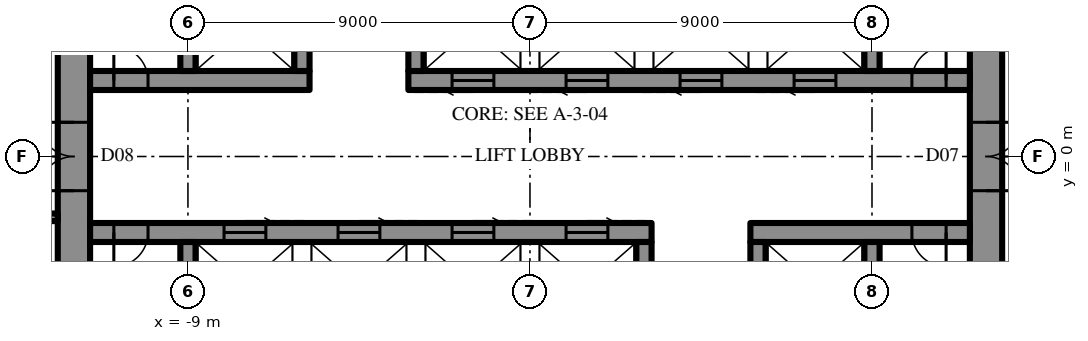
"""IFC4 building model, lengths in metres.
Left out: names, types, materials, properties, quantities, classifications, styles, units other than length and angle.
Written with IfcOpenShell. Run it as: python <this file> out.ifc"""

import sys

from ifc_helpers import new_model, si_unit, direction, frame, frame_2d, origin, place, context, subcontext, project, spatial, rectangle, extrude, element, fill, save


model = new_model("IFC4")
c1 = context("Model", 3, precision=1e-05, world=origin(), true_north=direction((0.0, 1.0)))
c2 = subcontext(c1, "Body", "Model", "MODEL_VIEW")
j1 = project(units=[si_unit("LENGTHUNIT", "METRE"), si_unit("PLANEANGLEUNIT", "RADIAN")], contexts=[c1])
p1 = place(None, origin())
s1 = spatial("IfcSite", under=j1, at=p1, CompositionType="ELEMENT")
p2 = place(p1, origin())
s2 = spatial("IfcBuilding", under=s1, at=p2, CompositionType="ELEMENT")
p3 = place(p2, frame((0.0, 0.0, 357.7)))
s3 = spatial("IfcBuildingStorey", under=s2, at=p3, CompositionType="ELEMENT", Elevation=357.7)
p4 = place(p3, frame((12.0, -10.7, 0.0), z_axis=(0.0, 0.0, 1.0), x_axis=(0.0, 1.0, 0.0)))
e1 = element("IfcWall", 1, at=p4, inside=s3, PredefinedType="SHEAR", context=c2, shape_type="SweptSolid", body=[
    extrude(rectangle(XDim=21.4, YDim=0.85, at=frame_2d((10.7, 0.0))), origin(), (0.0, 0.0, 1.0), 4.2),
])
p5 = place(p4, frame((9.8, 0.0, 0.0)))
e2 = element("IfcOpeningElement", 2, at=p5, cuts=e1, PredefinedType="OPENING", context=c2, shape_type="SweptSolid", body=[
    extrude(rectangle(XDim=1.8, YDim=2.4, at=frame_2d((0.9, 1.2))), frame((0.0, 0.435, 0.0), z_axis=(0.0, -1.0, 0.0), x_axis=(1.0, 0.0, 0.0)), (0.0, 0.0, 1.0), 0.87),
])
p6 = place(p3, frame((-12.0, 10.7, 0.0), z_axis=(0.0, 0.0, 1.0), x_axis=(0.0, -1.0, 0.0)))
e3 = element("IfcWall", 3, at=p6, inside=s3, PredefinedType="SHEAR", context=c2, shape_type="SweptSolid", body=[
    extrude(rectangle(XDim=21.4, YDim=0.85, at=frame_2d((10.7, 0.0))), origin(), (0.0, 0.0, 1.0), 4.2),
])
p7 = place(p6, frame((9.8, 0.0, 0.0)))
e4 = element("IfcOpeningElement", 4, at=p7, cuts=e3, PredefinedType="OPENING", context=c2, shape_type="SweptSolid", body=[
    extrude(rectangle(XDim=1.8, YDim=2.4, at=frame_2d((0.9, 1.2))), frame((0.0, 0.435, 0.0), z_axis=(0.0, -1.0, 0.0), x_axis=(1.0, 0.0, 0.0)), (0.0, 0.0, 1.0), 0.87),
])
p8 = place(p3, frame((-11.575, 2.0, 0.0), z_axis=(0.0, 0.0, 1.0), x_axis=(1.0, 0.0, 0.0)))
e5 = element("IfcWall", 5, at=p8, inside=s3, PredefinedType="SHEAR", context=c2, shape_type="SweptSolid", body=[
    extrude(rectangle(XDim=5.775, YDim=0.5, at=frame_2d((2.887, 0.0))), origin(), (0.0, 0.0, 1.0), 4.2),
])
p9 = place(p8, frame((0.625, 0.0, 0.0)))
e6 = element("IfcOpeningElement", 6, at=p9, cuts=e5, PredefinedType="OPENING", context=c2, shape_type="SweptSolid", body=[
    extrude(rectangle(XDim=0.9, YDim=2.2, at=frame_2d((0.45, 1.1))), frame((0.0, 0.26, 0.0), z_axis=(0.0, -1.0, 0.0), x_axis=(1.0, 0.0, 0.0)), (0.0, 0.0, 1.0), 0.52),
])
p10 = place(p3, frame((-3.2, 2.0, 0.0), z_axis=(0.0, 0.0, 1.0), x_axis=(1.0, 0.0, 0.0)))
e7 = element("IfcWall", 7, at=p10, inside=s3, PredefinedType="SHEAR", context=c2, shape_type="SweptSolid", body=[
    extrude(rectangle(XDim=14.775, YDim=0.5, at=frame_2d((7.387, 0.0))), origin(), (0.0, 0.0, 1.0), 4.2),
])
p11 = place(p10, frame((13.25, 0.0, 0.0)))
e8 = element("IfcOpeningElement", 8, at=p11, cuts=e7, PredefinedType="OPENING", context=c2, shape_type="SweptSolid", body=[
    extrude(rectangle(XDim=0.9, YDim=2.2, at=frame_2d((0.45, 1.1))), frame((0.0, 0.26, 0.0), z_axis=(0.0, -1.0, 0.0), x_axis=(1.0, 0.0, 0.0)), (0.0, 0.0, 1.0), 0.52),
])
p12 = place(p10, frame((1.15, 0.0, 0.0)))
e9 = element("IfcOpeningElement", 9, at=p12, cuts=e7, PredefinedType="OPENING", context=c2, shape_type="SweptSolid", body=[
    extrude(rectangle(XDim=1.1, YDim=2.2, at=frame_2d((0.55, 1.1))), frame((0.0, 0.26, 0.0), z_axis=(0.0, -1.0, 0.0), x_axis=(1.0, 0.0, 0.0)), (0.0, 0.0, 1.0), 0.52),
])
p13 = place(p10, frame((4.15, 0.0, 0.0)))
e10 = element("IfcOpeningElement", 10, at=p13, cuts=e7, PredefinedType="OPENING", context=c2, shape_type="SweptSolid", body=[
    extrude(rectangle(XDim=1.1, YDim=2.2, at=frame_2d((0.55, 1.1))), frame((0.0, 0.26, 0.0), z_axis=(0.0, -1.0, 0.0), x_axis=(1.0, 0.0, 0.0)), (0.0, 0.0, 1.0), 0.52),
])
p14 = place(p10, frame((7.15, 0.0, 0.0)))
e11 = element("IfcOpeningElement", 11, at=p14, cuts=e7, PredefinedType="OPENING", context=c2, shape_type="SweptSolid", body=[
    extrude(rectangle(XDim=1.1, YDim=2.2, at=frame_2d((0.55, 1.1))), frame((0.0, 0.26, 0.0), z_axis=(0.0, -1.0, 0.0), x_axis=(1.0, 0.0, 0.0)), (0.0, 0.0, 1.0), 0.52),
])
p15 = place(p10, frame((10.15, 0.0, 0.0)))
e12 = element("IfcOpeningElement", 12, at=p15, cuts=e7, PredefinedType="OPENING", context=c2, shape_type="SweptSolid", body=[
    extrude(rectangle(XDim=1.1, YDim=2.2, at=frame_2d((0.55, 1.1))), frame((0.0, 0.26, 0.0), z_axis=(0.0, -1.0, 0.0), x_axis=(1.0, 0.0, 0.0)), (0.0, 0.0, 1.0), 0.52),
])
for number, where, z_axis, x_axis in (
    (13, (-9.0, 2.25, 0.0), (0.0, 0.0, 1.0), (0.0, 1.0, 0.0)),
    (14, (-6.0, 2.25, 0.0), (0.0, 0.0, 1.0), (0.0, 1.0, 0.0)),
    (15, (-3.0, 2.25, 0.0), (0.0, 0.0, 1.0), (0.0, 1.0, 0.0)),
    (16, (9.0, 2.25, 0.0), (0.0, 0.0, 1.0), (0.0, 1.0, 0.0)),
):
    element("IfcWall", number, at=place(p3, frame(where, z_axis=z_axis, x_axis=x_axis)), inside=s3, PredefinedType="SHEAR", context=c2, shape_type="SweptSolid", body=[
        extrude(rectangle(XDim=2.3, YDim=0.4, at=frame_2d((1.15, 0.0))), origin(), (0.0, 0.0, 1.0), 4.2),
    ])
p16 = place(p3, frame((11.575, -2.0, 0.0), z_axis=(0.0, 0.0, 1.0), x_axis=(-1.0, 0.0, 0.0)))
e17 = element("IfcWall", 17, at=p16, inside=s3, PredefinedType="SHEAR", context=c2, shape_type="SweptSolid", body=[
    extrude(rectangle(XDim=5.775, YDim=0.5, at=frame_2d((2.887, 0.0))), origin(), (0.0, 0.0, 1.0), 4.2),
])
p17 = place(p16, frame((0.625, 0.0, 0.0)))
e18 = element("IfcOpeningElement", 18, at=p17, cuts=e17, PredefinedType="OPENING", context=c2, shape_type="SweptSolid", body=[
    extrude(rectangle(XDim=0.9, YDim=2.2, at=frame_2d((0.45, 1.1))), frame((0.0, 0.26, 0.0), z_axis=(0.0, -1.0, 0.0), x_axis=(1.0, 0.0, 0.0)), (0.0, 0.0, 1.0), 0.52),
])
p18 = place(p3, frame((3.2, -2.0, 0.0), z_axis=(0.0, 0.0, 1.0), x_axis=(-1.0, 0.0, 0.0)))
e19 = element("IfcWall", 19, at=p18, inside=s3, PredefinedType="SHEAR", context=c2, shape_type="SweptSolid", body=[
    extrude(rectangle(XDim=14.775, YDim=0.5, at=frame_2d((7.387, 0.0))), origin(), (0.0, 0.0, 1.0), 4.2),
])
p19 = place(p18, frame((13.25, 0.0, 0.0)))
e20 = element("IfcOpeningElement", 20, at=p19, cuts=e19, PredefinedType="OPENING", context=c2, shape_type="SweptSolid", body=[
    extrude(rectangle(XDim=0.9, YDim=2.2, at=frame_2d((0.45, 1.1))), frame((0.0, 0.26, 0.0), z_axis=(0.0, -1.0, 0.0), x_axis=(1.0, 0.0, 0.0)), (0.0, 0.0, 1.0), 0.52),
])
p20 = place(p18, frame((1.15, 0.0, 0.0)))
e21 = element("IfcOpeningElement", 21, at=p20, cuts=e19, PredefinedType="OPENING", context=c2, shape_type="SweptSolid", body=[
    extrude(rectangle(XDim=1.1, YDim=2.2, at=frame_2d((0.55, 1.1))), frame((0.0, 0.26, 0.0), z_axis=(0.0, -1.0, 0.0), x_axis=(1.0, 0.0, 0.0)), (0.0, 0.0, 1.0), 0.52),
])
p21 = place(p18, frame((4.15, 0.0, 0.0)))
e22 = element("IfcOpeningElement", 22, at=p21, cuts=e19, PredefinedType="OPENING", context=c2, shape_type="SweptSolid", body=[
    extrude(rectangle(XDim=1.1, YDim=2.2, at=frame_2d((0.55, 1.1))), frame((0.0, 0.26, 0.0), z_axis=(0.0, -1.0, 0.0), x_axis=(1.0, 0.0, 0.0)), (0.0, 0.0, 1.0), 0.52),
])
p22 = place(p18, frame((7.15, 0.0, 0.0)))
e23 = element("IfcOpeningElement", 23, at=p22, cuts=e19, PredefinedType="OPENING", context=c2, shape_type="SweptSolid", body=[
    extrude(rectangle(XDim=1.1, YDim=2.2, at=frame_2d((0.55, 1.1))), frame((0.0, 0.26, 0.0), z_axis=(0.0, -1.0, 0.0), x_axis=(1.0, 0.0, 0.0)), (0.0, 0.0, 1.0), 0.52),
])
p23 = place(p18, frame((10.15, 0.0, 0.0)))
e24 = element("IfcOpeningElement", 24, at=p23, cuts=e19, PredefinedType="OPENING", context=c2, shape_type="SweptSolid", body=[
    extrude(rectangle(XDim=1.1, YDim=2.2, at=frame_2d((0.55, 1.1))), frame((0.0, 0.26, 0.0), z_axis=(0.0, -1.0, 0.0), x_axis=(1.0, 0.0, 0.0)), (0.0, 0.0, 1.0), 0.52),
])
for number, where, z_axis, x_axis in (
    (25, (9.0, -2.25, 0.0), (0.0, 0.0, 1.0), (0.0, -1.0, 0.0)),
    (26, (6.0, -2.25, 0.0), (0.0, 0.0, 1.0), (0.0, -1.0, 0.0)),
    (27, (3.0, -2.25, 0.0), (0.0, 0.0, 1.0), (0.0, -1.0, 0.0)),
    (28, (-9.0, -2.25, 0.0), (0.0, 0.0, 1.0), (0.0, -1.0, 0.0)),
):
    element("IfcWall", number, at=place(p3, frame(where, z_axis=z_axis, x_axis=x_axis)), inside=s3, PredefinedType="SHEAR", context=c2, shape_type="SweptSolid", body=[
        extrude(rectangle(XDim=2.3, YDim=0.4, at=frame_2d((1.15, 0.0))), origin(), (0.0, 0.0, 1.0), 4.2),
    ])
p24 = place(p3, frame((-12.425, -1.6, 0.0), z_axis=(0.0, 0.0, 1.0), x_axis=(-1.0, 0.0, 0.0)))
e29 = element("IfcWall", 29, at=p24, inside=s3, PredefinedType="PARTITIONING", context=c2, shape_type="SweptSolid", body=[
    extrude(rectangle(XDim=16.5, YDim=0.2, at=frame_2d((8.25, 0.0))), origin(), (0.0, 0.0, 1.0), 4.0),
])
p25 = place(p24, frame((1.15, 0.0, 0.0)))
e30 = element("IfcOpeningElement", 30, at=p25, cuts=e29, PredefinedType="OPENING", context=c2, shape_type="SweptSolid", body=[
    extrude(rectangle(XDim=1.0, YDim=2.2, at=frame_2d((0.5, 1.1))), frame((0.0, 0.11, 0.0), z_axis=(0.0, -1.0, 0.0), x_axis=(1.0, 0.0, 0.0)), (0.0, 0.0, 1.0), 0.22),
])
p26 = place(p5, frame((1.8, 0.0, 0.0), z_axis=(0.0, 0.0, 1.0), x_axis=(-1.0, 0.0, 0.0)))
e31 = element("IfcDoor", 31, at=p26, inside=s3, OperationType="DOUBLE_DOOR_SINGLE_SWING", PredefinedType="DOOR", context=c2, shape_type="SweptSolid", body=[
    extrude(rectangle(XDim=1.8, YDim=2.4, at=frame_2d((0.9, 1.2))), frame((0.0, 0.025, 0.0), z_axis=(0.0, -1.0, 0.0), x_axis=(1.0, 0.0, 0.0)), (0.0, 0.0, 1.0), 0.05),
])
fill(e2, e31)
p27 = place(p7, frame((1.8, 0.0, 0.0), z_axis=(0.0, 0.0, 1.0), x_axis=(-1.0, 0.0, 0.0)))
e32 = element("IfcDoor", 32, at=p27, inside=s3, OperationType="DOUBLE_DOOR_SINGLE_SWING", PredefinedType="DOOR", context=c2, shape_type="SweptSolid", body=[
    extrude(rectangle(XDim=1.8, YDim=2.4, at=frame_2d((0.9, 1.2))), frame((0.0, 0.025, 0.0), z_axis=(0.0, -1.0, 0.0), x_axis=(1.0, 0.0, 0.0)), (0.0, 0.0, 1.0), 0.05),
])
fill(e4, e32)
p28 = place(p9, origin())
e33 = element("IfcDoor", 33, at=p28, inside=s3, OperationType="SINGLE_SWING_RIGHT", PredefinedType="DOOR", context=c2, shape_type="SweptSolid", body=[
    extrude(rectangle(XDim=0.9, YDim=2.2, at=frame_2d((0.45, 1.1))), frame((0.0, 0.025, 0.0), z_axis=(0.0, -1.0, 0.0), x_axis=(1.0, 0.0, 0.0)), (0.0, 0.0, 1.0), 0.05),
])
fill(e6, e33)
p29 = place(p11, origin())
e34 = element("IfcDoor", 34, at=p29, inside=s3, OperationType="SINGLE_SWING_LEFT", PredefinedType="DOOR", context=c2, shape_type="SweptSolid", body=[
    extrude(rectangle(XDim=0.9, YDim=2.2, at=frame_2d((0.45, 1.1))), frame((0.0, 0.025, 0.0), z_axis=(0.0, -1.0, 0.0), x_axis=(1.0, 0.0, 0.0)), (0.0, 0.0, 1.0), 0.05),
])
fill(e8, e34)
p30 = place(p17, origin())
e35 = element("IfcDoor", 35, at=p30, inside=s3, OperationType="SINGLE_SWING_RIGHT", PredefinedType="DOOR", context=c2, shape_type="SweptSolid", body=[
    extrude(rectangle(XDim=0.9, YDim=2.2, at=frame_2d((0.45, 1.1))), frame((0.0, 0.025, 0.0), z_axis=(0.0, -1.0, 0.0), x_axis=(1.0, 0.0, 0.0)), (0.0, 0.0, 1.0), 0.05),
])
fill(e18, e35)
p31 = place(p19, origin())
e36 = element("IfcDoor", 36, at=p31, inside=s3, OperationType="SINGLE_SWING_LEFT", PredefinedType="DOOR", context=c2, shape_type="SweptSolid", body=[
    extrude(rectangle(XDim=0.9, YDim=2.2, at=frame_2d((0.45, 1.1))), frame((0.0, 0.025, 0.0), z_axis=(0.0, -1.0, 0.0), x_axis=(1.0, 0.0, 0.0)), (0.0, 0.0, 1.0), 0.05),
])
fill(e20, e36)
p32 = place(p12, frame((1.1, 0.0, 0.0), z_axis=(0.0, 0.0, 1.0), x_axis=(-1.0, 0.0, 0.0)))
e37 = element("IfcDoor", 37, at=p32, inside=s3, OperationType="SLIDING_TO_LEFT", PredefinedType="DOOR", context=c2, shape_type="SweptSolid", body=[
    extrude(rectangle(XDim=1.1, YDim=2.2, at=frame_2d((0.55, 1.1))), frame((0.0, 0.025, 0.0), z_axis=(0.0, -1.0, 0.0), x_axis=(1.0, 0.0, 0.0)), (0.0, 0.0, 1.0), 0.05),
])
fill(e9, e37)
p33 = place(p13, frame((1.1, 0.0, 0.0), z_axis=(0.0, 0.0, 1.0), x_axis=(-1.0, 0.0, 0.0)))
e38 = element("IfcDoor", 38, at=p33, inside=s3, OperationType="SLIDING_TO_LEFT", PredefinedType="DOOR", context=c2, shape_type="SweptSolid", body=[
    extrude(rectangle(XDim=1.1, YDim=2.2, at=frame_2d((0.55, 1.1))), frame((0.0, 0.025, 0.0), z_axis=(0.0, -1.0, 0.0), x_axis=(1.0, 0.0, 0.0)), (0.0, 0.0, 1.0), 0.05),
])
fill(e10, e38)
p34 = place(p14, frame((1.1, 0.0, 0.0), z_axis=(0.0, 0.0, 1.0), x_axis=(-1.0, 0.0, 0.0)))
e39 = element("IfcDoor", 39, at=p34, inside=s3, OperationType="SLIDING_TO_LEFT", PredefinedType="DOOR", context=c2, shape_type="SweptSolid", body=[
    extrude(rectangle(XDim=1.1, YDim=2.2, at=frame_2d((0.55, 1.1))), frame((0.0, 0.025, 0.0), z_axis=(0.0, -1.0, 0.0), x_axis=(1.0, 0.0, 0.0)), (0.0, 0.0, 1.0), 0.05),
])
fill(e11, e39)
p35 = place(p15, frame((1.1, 0.0, 0.0), z_axis=(0.0, 0.0, 1.0), x_axis=(-1.0, 0.0, 0.0)))
e40 = element("IfcDoor", 40, at=p35, inside=s3, OperationType="SLIDING_TO_LEFT", PredefinedType="DOOR", context=c2, shape_type="SweptSolid", body=[
    extrude(rectangle(XDim=1.1, YDim=2.2, at=frame_2d((0.55, 1.1))), frame((0.0, 0.025, 0.0), z_axis=(0.0, -1.0, 0.0), x_axis=(1.0, 0.0, 0.0)), (0.0, 0.0, 1.0), 0.05),
])
fill(e12, e40)
p36 = place(p20, frame((1.1, 0.0, 0.0), z_axis=(0.0, 0.0, 1.0), x_axis=(-1.0, 0.0, 0.0)))
e41 = element("IfcDoor", 41, at=p36, inside=s3, OperationType="SLIDING_TO_LEFT", PredefinedType="DOOR", context=c2, shape_type="SweptSolid", body=[
    extrude(rectangle(XDim=1.1, YDim=2.2, at=frame_2d((0.55, 1.1))), frame((0.0, 0.025, 0.0), z_axis=(0.0, -1.0, 0.0), x_axis=(1.0, 0.0, 0.0)), (0.0, 0.0, 1.0), 0.05),
])
fill(e21, e41)
p37 = place(p21, frame((1.1, 0.0, 0.0), z_axis=(0.0, 0.0, 1.0), x_axis=(-1.0, 0.0, 0.0)))
e42 = element("IfcDoor", 42, at=p37, inside=s3, OperationType="SLIDING_TO_LEFT", PredefinedType="DOOR", context=c2, shape_type="SweptSolid", body=[
    extrude(rectangle(XDim=1.1, YDim=2.2, at=frame_2d((0.55, 1.1))), frame((0.0, 0.025, 0.0), z_axis=(0.0, -1.0, 0.0), x_axis=(1.0, 0.0, 0.0)), (0.0, 0.0, 1.0), 0.05),
])
fill(e22, e42)
p38 = place(p22, frame((1.1, 0.0, 0.0), z_axis=(0.0, 0.0, 1.0), x_axis=(-1.0, 0.0, 0.0)))
e43 = element("IfcDoor", 43, at=p38, inside=s3, OperationType="SLIDING_TO_LEFT", PredefinedType="DOOR", context=c2, shape_type="SweptSolid", body=[
    extrude(rectangle(XDim=1.1, YDim=2.2, at=frame_2d((0.55, 1.1))), frame((0.0, 0.025, 0.0), z_axis=(0.0, -1.0, 0.0), x_axis=(1.0, 0.0, 0.0)), (0.0, 0.0, 1.0), 0.05),
])
fill(e23, e43)
p39 = place(p23, frame((1.1, 0.0, 0.0), z_axis=(0.0, 0.0, 1.0), x_axis=(-1.0, 0.0, 0.0)))
e44 = element("IfcDoor", 44, at=p39, inside=s3, OperationType="SLIDING_TO_LEFT", PredefinedType="DOOR", context=c2, shape_type="SweptSolid", body=[
    extrude(rectangle(XDim=1.1, YDim=2.2, at=frame_2d((0.55, 1.1))), frame((0.0, 0.025, 0.0), z_axis=(0.0, -1.0, 0.0), x_axis=(1.0, 0.0, 0.0)), (0.0, 0.0, 1.0), 0.05),
])
fill(e24, e44)
save(model, sys.argv[1])
